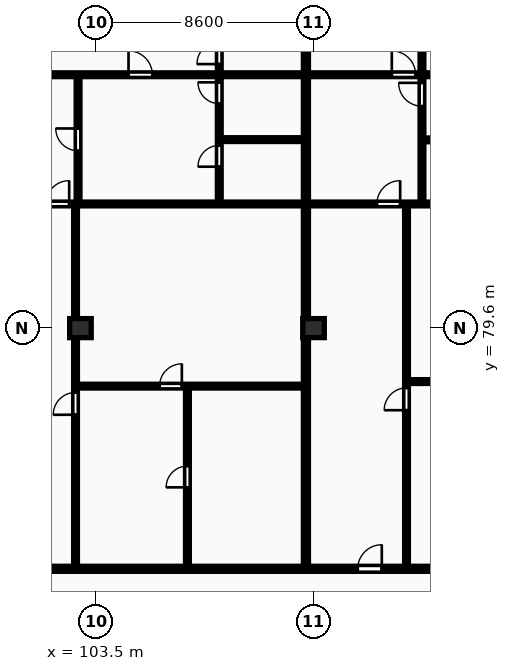
"""IFC4 building model, lengths in metres.
Left out: names, types, materials, properties, quantities, classifications, styles, units other than length and angle.
Written with IfcOpenShell. Run it as: python <this file> out.ifc"""

import sys

from ifc_helpers import new_model, si_unit, direction, frame, frame_2d, origin, origin_2d, place, context, subcontext, project, spatial, rectangle, extrude, element, fill, save


model = new_model("IFC4")
c1 = context("Model", 3, precision=1e-05, world=origin(), true_north=direction((0.0, 1.0)))
c2 = subcontext(c1, "Body", "Model", "MODEL_VIEW")
j1 = project(units=[si_unit("LENGTHUNIT", "METRE"), si_unit("PLANEANGLEUNIT", "RADIAN")], contexts=[c1])
p1 = place(None, origin())
s1 = spatial("IfcSite", under=j1, at=p1, CompositionType="ELEMENT")
p2 = place(p1, origin())
s2 = spatial("IfcBuilding", under=s1, at=p2, CompositionType="ELEMENT")
p3 = place(p2, frame((0.0, 0.0, 210.85)))
s3 = spatial("IfcBuildingStorey", under=s2, at=p3, CompositionType="ELEMENT", Elevation=210.85)
for number, where, z_axis, x_axis in (
    (1, (102.9, 79.6, 0.0), (0.0, 0.0, 1.0), (1.0, 0.0, 0.0)),
    (2, (112.1, 79.6, 0.0), (0.0, 0.0, 1.0), (1.0, 0.0, 0.0)),
):
    element("IfcColumn", number, at=place(p3, frame(where, z_axis=z_axis, x_axis=x_axis)), inside=s3, PredefinedType="COLUMN", context=c2, shape_type="SweptSolid", body=[
        extrude(rectangle(XDim=0.85, YDim=0.75, at=origin_2d()), origin(), (0.0, 0.0, 1.0), 3.25),
    ])
p4 = place(p3, frame((111.8, 70.18, 0.0), z_axis=(0.0, 0.0, 1.0), x_axis=(0.0, 1.0, 0.0)))
e3 = element("IfcWall", 3, at=p4, inside=s3, PredefinedType="PARTITIONING", context=c2, shape_type="SweptSolid", body=[
    extrude(rectangle(XDim=24.32, YDim=0.2, at=frame_2d((12.16, 0.0))), origin(), (0.0, 0.0, 1.0), 2.97),
])
p5 = place(p3, frame((107.123, 70.16, 0.0), z_axis=(0.0, 0.0, 1.0), x_axis=(0.0, 1.0, 0.0)))
e4 = element("IfcWall", 4, at=p5, inside=s3, PredefinedType="PARTITIONING", context=c2, shape_type="SweptSolid", body=[
    extrude(rectangle(XDim=7.15, YDim=0.15, at=frame_2d((3.575, 0.0))), origin(), (0.0, 0.0, 1.0), 2.97),
])
p6 = place(p5, frame((3.155, 0.0, 0.0)))
e5 = element("IfcOpeningElement", 5, at=p6, cuts=e4, PredefinedType="OPENING", context=c2, shape_type="SweptSolid", body=[
    extrude(rectangle(XDim=0.84, YDim=2.04, at=frame_2d((0.42, 1.02))), frame((0.0, 0.085, 0.0), z_axis=(0.0, -1.0, 0.0), x_axis=(1.0, 0.0, 0.0)), (0.0, 0.0, 1.0), 0.17),
])
p7 = place(p3, frame((102.766, 77.31, 0.0), z_axis=(0.0, 0.0, 1.0), x_axis=(1.0, 0.0, 0.0)))
e6 = element("IfcWall", 6, at=p7, inside=s3, PredefinedType="PARTITIONING", context=c2, shape_type="SweptSolid", body=[
    extrude(rectangle(XDim=8.954, YDim=0.15, at=frame_2d((4.477, 0.0))), origin(), (0.0, 0.0, 1.0), 2.97),
])
p8 = place(p7, frame((3.257, 0.0, 0.0)))
e7 = element("IfcOpeningElement", 7, at=p8, cuts=e6, PredefinedType="OPENING", context=c2, shape_type="SweptSolid", body=[
    extrude(rectangle(XDim=0.88, YDim=2.06, at=frame_2d((0.44, 1.03))), frame((0.0, 0.085, 0.0), z_axis=(0.0, -1.0, 0.0), x_axis=(1.0, 0.0, 0.0)), (0.0, 0.0, 1.0), 0.17),
])
p9 = place(p3, frame((102.706, 70.16, 0.0), z_axis=(0.0, 0.0, 1.0), x_axis=(0.0, 1.0, 0.0)))
e8 = element("IfcWall", 8, at=p9, inside=s3, PredefinedType="PARTITIONING", context=c2, shape_type="SweptSolid", body=[
    extrude(rectangle(XDim=14.3, YDim=0.15, at=frame_2d((7.15, 0.0))), origin(), (0.0, 0.0, 1.0), 2.277),
])
p10 = place(p9, frame((6.02, 0.0, 0.0)))
e9 = element("IfcOpeningElement", 9, at=p10, cuts=e8, PredefinedType="OPENING", context=c2, shape_type="SweptSolid", body=[
    extrude(rectangle(XDim=0.88, YDim=2.06, at=frame_2d((0.44, 1.03))), frame((0.0, 0.085, 0.0), z_axis=(0.0, -1.0, 0.0), x_axis=(1.0, 0.0, 0.0)), (0.0, 0.0, 1.0), 0.17),
])
p11 = place(p3, frame((102.806, 84.54, 0.0), z_axis=(0.0, 0.0, 1.0), x_axis=(0.0, 1.0, 0.0)))
e10 = element("IfcWall", 10, at=p11, inside=s3, PredefinedType="PARTITIONING", context=c2, shape_type="SweptSolid", body=[
    extrude(rectangle(XDim=5.0, YDim=0.15, at=frame_2d((2.5, 0.0))), origin(), (0.0, 0.0, 1.0), 2.277),
])
p12 = place(p11, frame((2.06, 0.0, 0.0)))
e11 = element("IfcOpeningElement", 11, at=p12, cuts=e10, PredefinedType="OPENING", context=c2, shape_type="SweptSolid", body=[
    extrude(rectangle(XDim=0.88, YDim=2.06, at=frame_2d((0.44, 1.03))), frame((0.0, 0.085, 0.0), z_axis=(0.0, -1.0, 0.0), x_axis=(1.0, 0.0, 0.0)), (0.0, 0.0, 1.0), 0.17),
])
p13 = place(p3, frame((108.44, 87.04, 0.0), z_axis=(0.0, 0.0, 1.0), x_axis=(1.0, 0.0, 0.0)))
e12 = element("IfcWall", 12, at=p13, inside=s3, PredefinedType="PARTITIONING", context=c2, shape_type="SweptSolid", body=[
    extrude(rectangle(XDim=3.28, YDim=0.15, at=frame_2d((1.64, 0.0))), origin(), (0.0, 0.0, 1.0), 2.97),
])
p14 = place(p3, frame((108.38, 84.54, 0.0), z_axis=(0.0, 0.0, 1.0), x_axis=(0.0, 1.0, 0.0)))
e13 = element("IfcWall", 13, at=p14, inside=s3, PredefinedType="PARTITIONING", context=c2, shape_type="SweptSolid", body=[
    extrude(rectangle(XDim=9.96, YDim=0.15, at=frame_2d((4.98, 0.0))), origin(), (0.0, 0.0, 1.0), 2.97),
])
p15 = place(p14, frame((1.43, 0.0, 0.0)))
e14 = element("IfcOpeningElement", 14, at=p15, cuts=e13, PredefinedType="OPENING", context=c2, shape_type="SweptSolid", body=[
    extrude(rectangle(XDim=0.84, YDim=2.04, at=frame_2d((0.42, 1.02))), frame((0.0, 0.085, 0.0), z_axis=(0.0, -1.0, 0.0), x_axis=(1.0, 0.0, 0.0)), (0.0, 0.0, 1.0), 0.17),
])
p16 = place(p14, frame((3.92, 0.0, 0.0)))
e15 = element("IfcOpeningElement", 15, at=p16, cuts=e13, PredefinedType="OPENING", context=c2, shape_type="SweptSolid", body=[
    extrude(rectangle(XDim=0.84, YDim=2.04, at=frame_2d((0.42, 1.02))), frame((0.0, 0.085, 0.0), z_axis=(0.0, -1.0, 0.0), x_axis=(1.0, 0.0, 0.0)), (0.0, 0.0, 1.0), 0.17),
])
p17 = place(p14, frame((5.48, 0.0, 0.0)))
e16 = element("IfcOpeningElement", 16, at=p17, cuts=e13, PredefinedType="OPENING", context=c2, shape_type="SweptSolid", body=[
    extrude(rectangle(XDim=0.88, YDim=2.06, at=frame_2d((0.44, 1.03))), frame((0.0, 0.085, 0.0), z_axis=(0.0, -1.0, 0.0), x_axis=(1.0, 0.0, 0.0)), (0.0, 0.0, 1.0), 0.17),
])
p18 = place(p3, frame((98.816, 84.5, 0.0), z_axis=(0.0, 0.0, 1.0), x_axis=(1.0, 0.0, 0.0)))
e17 = element("IfcWall", 17, at=p18, inside=s3, PredefinedType="PARTITIONING", context=c2, shape_type="SweptSolid", body=[
    extrude(rectangle(XDim=12.904, YDim=0.15, at=frame_2d((6.452, 0.0))), origin(), (0.0, 0.0, 1.0), 2.97),
])
p19 = place(p18, frame((2.72, 0.0, 0.0)))
e18 = element("IfcOpeningElement", 18, at=p19, cuts=e17, PredefinedType="OPENING", context=c2, shape_type="SweptSolid", body=[
    extrude(rectangle(XDim=0.92, YDim=2.08, at=frame_2d((0.46, 1.04))), frame((0.0, 0.085, 0.0), z_axis=(0.0, -1.0, 0.0), x_axis=(1.0, 0.0, 0.0)), (0.0, 0.0, 1.0), 0.17),
])
p20 = place(p3, frame((98.816, 89.6, 0.0), z_axis=(0.0, 0.0, 1.0), x_axis=(1.0, 0.0, 0.0)))
e19 = element("IfcWall", 19, at=p20, inside=s3, PredefinedType="PARTITIONING", context=c2, shape_type="SweptSolid", body=[
    extrude(rectangle(XDim=12.904, YDim=0.15, at=frame_2d((6.452, 0.0))), origin(), (0.0, 0.0, 1.0), 2.97),
])
p21 = place(p20, frame((5.982, 0.0, 0.0)))
e20 = element("IfcOpeningElement", 20, at=p21, cuts=e19, PredefinedType="OPENING", context=c2, shape_type="SweptSolid", body=[
    extrude(rectangle(XDim=0.94, YDim=2.1, at=frame_2d((0.47, 1.05))), frame((0.0, 0.085, 0.0), z_axis=(0.0, -1.0, 0.0), x_axis=(1.0, 0.0, 0.0)), (0.0, 0.0, 1.0), 0.17),
])
p22 = place(p3, frame((115.83, 77.49, 0.0), z_axis=(0.0, 0.0, 1.0), x_axis=(1.0, 0.0, 0.0)))
e21 = element("IfcWall", 21, at=p22, inside=s3, PredefinedType="PARTITIONING", context=c2, shape_type="SweptSolid", body=[
    extrude(rectangle(XDim=12.49, YDim=0.15, at=frame_2d((6.245, 0.0))), origin(), (0.0, 0.0, 1.0), 2.97),
])
p23 = place(p22, frame((1.917, 0.0, 0.0)))
e22 = element("IfcOpeningElement", 22, at=p23, cuts=e21, PredefinedType="OPENING", context=c2, shape_type="SweptSolid", body=[
    extrude(rectangle(XDim=0.88, YDim=2.06, at=frame_2d((0.44, 1.03))), frame((0.0, 0.085, 0.0), z_axis=(0.0, -1.0, 0.0), x_axis=(1.0, 0.0, 0.0)), (0.0, 0.0, 1.0), 0.17),
])
p24 = place(p3, frame((115.77, 70.16, 0.0), z_axis=(0.0, 0.0, 1.0), x_axis=(0.0, 1.0, 0.0)))
e23 = element("IfcWall", 23, at=p24, inside=s3, PredefinedType="PARTITIONING", context=c2, shape_type="SweptSolid", body=[
    extrude(rectangle(XDim=14.3, YDim=0.15, at=frame_2d((7.15, 0.0))), origin(), (0.0, 0.0, 1.0), 2.97),
])
p25 = place(p24, frame((6.2, 0.0, 0.0)))
e24 = element("IfcOpeningElement", 24, at=p25, cuts=e23, PredefinedType="OPENING", context=c2, shape_type="SweptSolid", body=[
    extrude(rectangle(XDim=0.88, YDim=2.06, at=frame_2d((0.44, 1.03))), frame((0.0, 0.085, 0.0), z_axis=(0.0, -1.0, 0.0), x_axis=(1.0, 0.0, 0.0)), (0.0, 0.0, 1.0), 0.17),
])
p26 = place(p3, frame((116.38, 84.54, 0.0), z_axis=(0.0, 0.0, 1.0), x_axis=(0.0, 1.0, 0.0)))
e25 = element("IfcWall", 25, at=p26, inside=s3, PredefinedType="PARTITIONING", context=c2, shape_type="SweptSolid", body=[
    extrude(rectangle(XDim=9.96, YDim=0.15, at=frame_2d((4.98, 0.0))), origin(), (0.0, 0.0, 1.0), 2.97),
])
p27 = place(p26, frame((3.82, 0.0, 0.0)))
e26 = element("IfcOpeningElement", 26, at=p27, cuts=e25, PredefinedType="OPENING", context=c2, shape_type="SweptSolid", body=[
    extrude(rectangle(XDim=0.92, YDim=2.08, at=frame_2d((0.46, 1.04))), frame((0.0, 0.085, 0.0), z_axis=(0.0, -1.0, 0.0), x_axis=(1.0, 0.0, 0.0)), (0.0, 0.0, 1.0), 0.17),
])
p28 = place(p3, frame((116.42, 87.03, 0.0), z_axis=(0.0, 0.0, 1.0), x_axis=(1.0, 0.0, 0.0)))
e27 = element("IfcWall", 27, at=p28, inside=s3, PredefinedType="PARTITIONING", context=c2, shape_type="SweptSolid", body=[
    extrude(rectangle(XDim=11.9, YDim=0.15, at=frame_2d((5.95, 0.0))), origin(), (0.0, 0.0, 1.0), 2.97),
])
p29 = place(p28, frame((5.53, 0.0, 0.0)))
e28 = element("IfcOpeningElement", 28, at=p29, cuts=e27, PredefinedType="OPENING", context=c2, shape_type="SweptSolid", body=[
    extrude(rectangle(XDim=0.84, YDim=2.04, at=frame_2d((0.42, 1.02))), frame((0.0, 0.085, 0.0), z_axis=(0.0, -1.0, 0.0), x_axis=(1.0, 0.0, 0.0)), (0.0, 0.0, 1.0), 0.17),
])
p30 = place(p28, frame((7.529, 0.0, 0.0)))
e29 = element("IfcOpeningElement", 29, at=p30, cuts=e27, PredefinedType="OPENING", context=c2, shape_type="SweptSolid", body=[
    extrude(rectangle(XDim=0.84, YDim=2.04, at=frame_2d((0.42, 1.02))), frame((0.0, 0.085, 0.0), z_axis=(0.0, -1.0, 0.0), x_axis=(1.0, 0.0, 0.0)), (0.0, 0.0, 1.0), 0.17),
])
p31 = place(p3, frame((111.88, 84.5, 0.0), z_axis=(0.0, 0.0, 1.0), x_axis=(1.0, 0.0, 0.0)))
e30 = element("IfcWall", 30, at=p31, inside=s3, PredefinedType="PARTITIONING", context=c2, shape_type="SweptSolid", body=[
    extrude(rectangle(XDim=16.44, YDim=0.15, at=frame_2d((8.22, 0.0))), origin(), (0.0, 0.0, 1.0), 2.97),
])
p32 = place(p31, frame((2.72, 0.0, 0.0)))
e31 = element("IfcOpeningElement", 31, at=p32, cuts=e30, PredefinedType="OPENING", context=c2, shape_type="SweptSolid", body=[
    extrude(rectangle(XDim=0.92, YDim=2.08, at=frame_2d((0.46, 1.04))), frame((0.0, 0.085, 0.0), z_axis=(0.0, -1.0, 0.0), x_axis=(1.0, 0.0, 0.0)), (0.0, 0.0, 1.0), 0.17),
])
p33 = place(p3, frame((111.88, 89.6, 0.0), z_axis=(0.0, 0.0, 1.0), x_axis=(1.0, 0.0, 0.0)))
e32 = element("IfcWall", 32, at=p33, inside=s3, PredefinedType="PARTITIONING", context=c2, shape_type="SweptSolid", body=[
    extrude(rectangle(XDim=11.819, YDim=0.15, at=frame_2d((5.91, 0.0))), origin(), (0.0, 0.0, 1.0), 2.97),
])
p34 = place(p33, frame((3.31, 0.0, 0.0)))
e33 = element("IfcOpeningElement", 33, at=p34, cuts=e32, PredefinedType="OPENING", context=c2, shape_type="SweptSolid", body=[
    extrude(rectangle(XDim=0.94, YDim=2.1, at=frame_2d((0.47, 1.05))), frame((0.0, 0.085, 0.0), z_axis=(0.0, -1.0, 0.0), x_axis=(1.0, 0.0, 0.0)), (0.0, 0.0, 1.0), 0.17),
])
p35 = place(p33, frame((5.469, 0.0, 0.0)))
e34 = element("IfcOpeningElement", 34, at=p35, cuts=e32, PredefinedType="OPENING", context=c2, shape_type="SweptSolid", body=[
    extrude(rectangle(XDim=0.88, YDim=2.06, at=frame_2d((0.44, 1.03))), frame((0.0, 0.085, 0.0), z_axis=(0.0, -1.0, 0.0), x_axis=(1.0, 0.0, 0.0)), (0.0, 0.0, 1.0), 0.17),
])
p36 = place(p33, frame((10.046, 0.0, 0.0)))
e35 = element("IfcOpeningElement", 35, at=p36, cuts=e32, PredefinedType="OPENING", context=c2, shape_type="SweptSolid", body=[
    extrude(rectangle(XDim=0.88, YDim=2.06, at=frame_2d((0.44, 1.03))), frame((0.0, 0.085, 0.0), z_axis=(0.0, -1.0, 0.0), x_axis=(1.0, 0.0, 0.0)), (0.0, 0.0, 1.0), 0.17),
])
p37 = place(p3, frame((59.8, 70.1, 0.0), z_axis=(0.0, 0.0, 1.0), x_axis=(1.0, 0.0, 0.0)))
e36 = element("IfcWall", 36, at=p37, inside=s3, PredefinedType="PARTITIONING", context=c2, shape_type="SweptSolid", body=[
    extrude(rectangle(XDim=68.6, YDim=0.2, at=frame_2d((34.3, 0.0))), origin(), (0.0, 0.0, 1.0), 2.97),
])
p38 = place(p37, frame((2.045, 0.0, 0.0)))
e37 = element("IfcOpeningElement", 37, at=p38, cuts=e36, PredefinedType="OPENING", context=c2, shape_type="SweptSolid", body=[
    extrude(rectangle(XDim=0.95, YDim=2.15, at=frame_2d((0.475, 1.075))), frame((0.0, 0.11, 0.0), z_axis=(0.0, -1.0, 0.0), x_axis=(1.0, 0.0, 0.0)), (0.0, 0.0, 1.0), 0.22),
])
p39 = place(p37, frame((14.981, 0.0, 0.0)))
e38 = element("IfcOpeningElement", 38, at=p39, cuts=e36, PredefinedType="OPENING", context=c2, shape_type="SweptSolid", body=[
    extrude(rectangle(XDim=0.95, YDim=2.15, at=frame_2d((0.475, 1.075))), frame((0.0, 0.11, 0.0), z_axis=(0.0, -1.0, 0.0), x_axis=(1.0, 0.0, 0.0)), (0.0, 0.0, 1.0), 0.22),
])
p40 = place(p37, frame((28.045, 0.0, 0.0)))
e39 = element("IfcOpeningElement", 39, at=p40, cuts=e36, PredefinedType="OPENING", context=c2, shape_type="SweptSolid", body=[
    extrude(rectangle(XDim=0.95, YDim=2.15, at=frame_2d((0.475, 1.075))), frame((0.0, 0.11, 0.0), z_axis=(0.0, -1.0, 0.0), x_axis=(1.0, 0.0, 0.0)), (0.0, 0.0, 1.0), 0.22),
])
p41 = place(p37, frame((40.981, 0.0, 0.0)))
e40 = element("IfcOpeningElement", 40, at=p41, cuts=e36, PredefinedType="OPENING", context=c2, shape_type="SweptSolid", body=[
    extrude(rectangle(XDim=0.95, YDim=2.15, at=frame_2d((0.475, 1.075))), frame((0.0, 0.11, 0.0), z_axis=(0.0, -1.0, 0.0), x_axis=(1.0, 0.0, 0.0)), (0.0, 0.0, 1.0), 0.22),
])
p42 = place(p37, frame((54.045, 0.0, 0.0)))
e41 = element("IfcOpeningElement", 41, at=p42, cuts=e36, PredefinedType="OPENING", context=c2, shape_type="SweptSolid", body=[
    extrude(rectangle(XDim=0.95, YDim=2.15, at=frame_2d((0.475, 1.075))), frame((0.0, 0.11, 0.0), z_axis=(0.0, -1.0, 0.0), x_axis=(1.0, 0.0, 0.0)), (0.0, 0.0, 1.0), 0.22),
])
p43 = place(p6, origin())
e42 = element("IfcDoor", 42, at=p43, inside=s3, OperationType="SINGLE_SWING_LEFT", PredefinedType="DOOR", context=c2, shape_type="SweptSolid", body=[
    extrude(rectangle(XDim=0.84, YDim=2.04, at=frame_2d((0.42, 1.02))), frame((0.0, 0.025, 0.0), z_axis=(0.0, -1.0, 0.0), x_axis=(1.0, 0.0, 0.0)), (0.0, 0.0, 1.0), 0.05),
])
fill(e5, e42)
p44 = place(p8, origin())
e43 = element("IfcDoor", 43, at=p44, inside=s3, OperationType="SINGLE_SWING_RIGHT", PredefinedType="DOOR", context=c2, shape_type="SweptSolid", body=[
    extrude(rectangle(XDim=0.88, YDim=2.06, at=frame_2d((0.44, 1.03))), frame((0.0, 0.025, 0.0), z_axis=(0.0, -1.0, 0.0), x_axis=(1.0, 0.0, 0.0)), (0.0, 0.0, 1.0), 0.05),
])
fill(e7, e43)
p45 = place(p10, origin())
e44 = element("IfcDoor", 44, at=p45, inside=s3, OperationType="SINGLE_SWING_LEFT", PredefinedType="DOOR", context=c2, shape_type="SweptSolid", body=[
    extrude(rectangle(XDim=0.88, YDim=2.06, at=frame_2d((0.44, 1.03))), frame((0.0, 0.025, 0.0), z_axis=(0.0, -1.0, 0.0), x_axis=(1.0, 0.0, 0.0)), (0.0, 0.0, 1.0), 0.05),
])
fill(e9, e44)
p46 = place(p12, origin())
e45 = element("IfcDoor", 45, at=p46, inside=s3, OperationType="SINGLE_SWING_RIGHT", PredefinedType="DOOR", context=c2, shape_type="SweptSolid", body=[
    extrude(rectangle(XDim=0.88, YDim=2.06, at=frame_2d((0.44, 1.03))), frame((0.0, 0.025, 0.0), z_axis=(0.0, -1.0, 0.0), x_axis=(1.0, 0.0, 0.0)), (0.0, 0.0, 1.0), 0.05),
])
fill(e11, e45)
p47 = place(p15, origin())
e46 = element("IfcDoor", 46, at=p47, inside=s3, OperationType="SINGLE_SWING_LEFT", PredefinedType="DOOR", context=c2, shape_type="SweptSolid", body=[
    extrude(rectangle(XDim=0.84, YDim=2.04, at=frame_2d((0.42, 1.02))), frame((0.0, 0.025, 0.0), z_axis=(0.0, -1.0, 0.0), x_axis=(1.0, 0.0, 0.0)), (0.0, 0.0, 1.0), 0.05),
])
fill(e14, e46)
p48 = place(p16, origin())
e47 = element("IfcDoor", 47, at=p48, inside=s3, OperationType="SINGLE_SWING_RIGHT", PredefinedType="DOOR", context=c2, shape_type="SweptSolid", body=[
    extrude(rectangle(XDim=0.84, YDim=2.04, at=frame_2d((0.42, 1.02))), frame((0.0, 0.025, 0.0), z_axis=(0.0, -1.0, 0.0), x_axis=(1.0, 0.0, 0.0)), (0.0, 0.0, 1.0), 0.05),
])
fill(e15, e47)
p49 = place(p17, origin())
e48 = element("IfcDoor", 48, at=p49, inside=s3, OperationType="SINGLE_SWING_LEFT", PredefinedType="DOOR", context=c2, shape_type="SweptSolid", body=[
    extrude(rectangle(XDim=0.88, YDim=2.06, at=frame_2d((0.44, 1.03))), frame((0.0, 0.025, 0.0), z_axis=(0.0, -1.0, 0.0), x_axis=(1.0, 0.0, 0.0)), (0.0, 0.0, 1.0), 0.05),
])
fill(e16, e48)
p50 = place(p19, origin())
e49 = element("IfcDoor", 49, at=p50, inside=s3, OperationType="SINGLE_SWING_RIGHT", PredefinedType="DOOR", context=c2, shape_type="SweptSolid", body=[
    extrude(rectangle(XDim=0.92, YDim=2.08, at=frame_2d((0.46, 1.04))), frame((0.0, 0.025, 0.0), z_axis=(0.0, -1.0, 0.0), x_axis=(1.0, 0.0, 0.0)), (0.0, 0.0, 1.0), 0.05),
])
fill(e18, e49)
p51 = place(p21, origin())
e50 = element("IfcDoor", 50, at=p51, inside=s3, OperationType="SINGLE_SWING_LEFT", PredefinedType="DOOR", context=c2, shape_type="SweptSolid", body=[
    extrude(rectangle(XDim=0.94, YDim=2.1, at=frame_2d((0.47, 1.05))), frame((0.0, 0.025, 0.0), z_axis=(0.0, -1.0, 0.0), x_axis=(1.0, 0.0, 0.0)), (0.0, 0.0, 1.0), 0.05),
])
fill(e20, e50)
p52 = place(p25, origin())
e51 = element("IfcDoor", 51, at=p52, inside=s3, OperationType="SINGLE_SWING_LEFT", PredefinedType="DOOR", context=c2, shape_type="SweptSolid", body=[
    extrude(rectangle(XDim=0.88, YDim=2.06, at=frame_2d((0.44, 1.03))), frame((0.0, 0.025, 0.0), z_axis=(0.0, -1.0, 0.0), x_axis=(1.0, 0.0, 0.0)), (0.0, 0.0, 1.0), 0.05),
])
fill(e24, e51)
p53 = place(p27, origin())
e52 = element("IfcDoor", 52, at=p53, inside=s3, OperationType="SINGLE_SWING_RIGHT", PredefinedType="DOOR", context=c2, shape_type="SweptSolid", body=[
    extrude(rectangle(XDim=0.92, YDim=2.08, at=frame_2d((0.46, 1.04))), frame((0.0, 0.025, 0.0), z_axis=(0.0, -1.0, 0.0), x_axis=(1.0, 0.0, 0.0)), (0.0, 0.0, 1.0), 0.05),
])
fill(e26, e52)
p54 = place(p32, origin())
e53 = element("IfcDoor", 53, at=p54, inside=s3, OperationType="SINGLE_SWING_RIGHT", PredefinedType="DOOR", context=c2, shape_type="SweptSolid", body=[
    extrude(rectangle(XDim=0.92, YDim=2.08, at=frame_2d((0.46, 1.04))), frame((0.0, 0.025, 0.0), z_axis=(0.0, -1.0, 0.0), x_axis=(1.0, 0.0, 0.0)), (0.0, 0.0, 1.0), 0.05),
])
fill(e31, e53)
p55 = place(p34, origin())
e54 = element("IfcDoor", 54, at=p55, inside=s3, OperationType="SINGLE_SWING_LEFT", PredefinedType="DOOR", context=c2, shape_type="SweptSolid", body=[
    extrude(rectangle(XDim=0.94, YDim=2.1, at=frame_2d((0.47, 1.05))), frame((0.0, 0.025, 0.0), z_axis=(0.0, -1.0, 0.0), x_axis=(1.0, 0.0, 0.0)), (0.0, 0.0, 1.0), 0.05),
])
fill(e33, e54)
p56 = place(p42, origin())
e55 = element("IfcDoor", 55, at=p56, inside=s3, OperationType="SINGLE_SWING_RIGHT", PredefinedType="DOOR", context=c2, shape_type="SweptSolid", body=[
    extrude(rectangle(XDim=0.95, YDim=2.15, at=frame_2d((0.475, 1.075))), frame((0.0, 0.025, 0.0), z_axis=(0.0, -1.0, 0.0), x_axis=(1.0, 0.0, 0.0)), (0.0, 0.0, 1.0), 0.05),
])
fill(e41, e55)
save(model, sys.argv[1])
